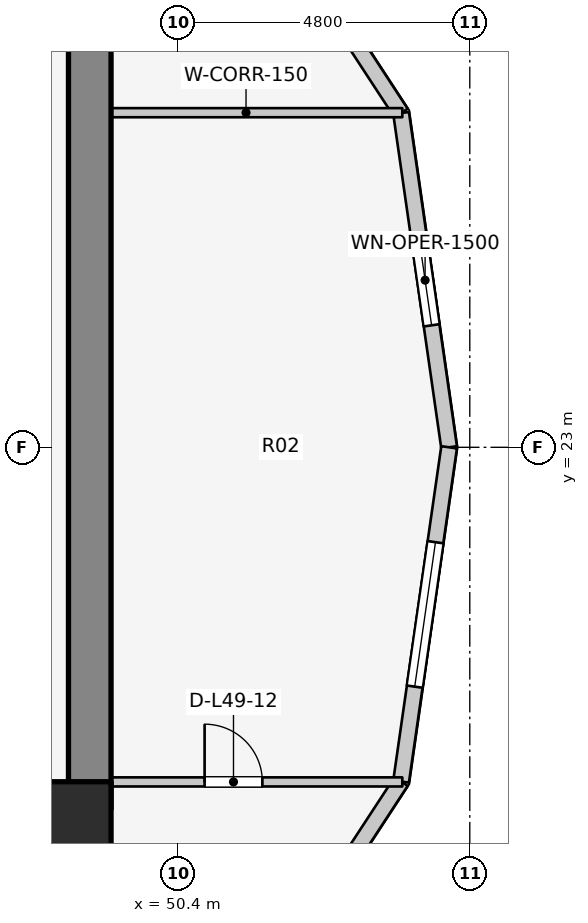
"""IFC4 building model, lengths in metres.
Left out: names, types, materials, properties, quantities, classifications, styles, units other than length and angle.
Written with IfcOpenShell. Run it as: python <this file> out.ifc"""

import sys

from ifc_helpers import new_model, si_unit, direction, frame, frame_2d, origin, origin_2d, place, context, subcontext, project, spatial, rectangle, extrude, element, fill, save


model = new_model("IFC4")
c1 = context("Model", 3, precision=1e-05, world=origin(), true_north=direction((0.0, 1.0)))
c2 = subcontext(c1, "Body", "Model", "MODEL_VIEW")
j1 = project(units=[si_unit("LENGTHUNIT", "METRE"), si_unit("PLANEANGLEUNIT", "RADIAN")], contexts=[c1])
p1 = place(None, origin())
s1 = spatial("IfcSite", under=j1, at=p1, CompositionType="ELEMENT")
p2 = place(p1, origin())
s2 = spatial("IfcBuilding", under=s1, at=p2, CompositionType="ELEMENT")
p3 = place(p2, frame((0.0, 0.0, 162.2)))
s3 = spatial("IfcBuildingStorey", under=s2, at=p3, CompositionType="ELEMENT", Elevation=162.2)
p4 = place(p3, frame((48.95, 17.05, 0.0), z_axis=(0.0, 0.0, 1.0), x_axis=(0.0, 1.0, 0.0)))
e1 = element("IfcWall", 1, at=p4, inside=s3, PredefinedType="SHEAR", context=c2, shape_type="SweptSolid", body=[
    extrude(rectangle(XDim=12.8, YDim=0.7, at=frame_2d((6.4, 0.0))), origin(), (0.0, 0.0, 1.0), 3.1),
])
p5 = place(p3, frame((48.7, 16.9, 0.0), z_axis=(0.0, 0.0, 1.0), x_axis=(1.0, 0.0, 0.0)))
e2 = element("IfcColumn", 2, at=p5, inside=s3, PredefinedType="COLUMN", context=c2, shape_type="SweptSolid", body=[
    extrude(rectangle(XDim=1.2, YDim=1.2, at=origin_2d()), origin(), (0.0, 0.0, 1.0), 3.1),
])
p6 = place(p3, frame((54.86, 23.0, 0.0), z_axis=(0.0, 0.0, 1.0), x_axis=(-0.142227632286, 0.989833976288, 0.0)))
e3 = element("IfcWall", 3, at=p6, inside=s3, PredefinedType="STANDARD", context=c2, shape_type="SweptSolid", body=[
    extrude(rectangle(XDim=5.553, YDim=0.26, at=frame_2d((2.776, 0.0))), origin(), (0.0, 0.0, 1.0), 2.85),
])
p7 = place(p6, frame((2.027, 0.0, 0.75)))
e4 = element("IfcOpeningElement", 4, at=p7, cuts=e3, PredefinedType="OPENING", context=c2, shape_type="SweptSolid", body=[
    extrude(rectangle(XDim=1.5, YDim=1.6, at=frame_2d((0.75, 0.8))), frame((0.0, 0.14, 0.0), z_axis=(0.0, -1.0, 0.0), x_axis=(1.0, 0.0, 0.0)), (0.0, 0.0, 1.0), 0.28),
])
p8 = place(p3, frame((54.07, 28.497, 0.0), z_axis=(0.0, 0.0, 1.0), x_axis=(-0.547456494366, 0.836834145322, 0.0)))
e5 = element("IfcWall", 5, at=p8, inside=s3, PredefinedType="STANDARD", context=c2, shape_type="SweptSolid", body=[
    extrude(rectangle(XDim=4.477, YDim=0.26, at=frame_2d((2.239, 0.0))), origin(), (0.0, 0.0, 1.0), 2.85),
])
p9 = place(p8, frame((1.489, 0.0, 0.75)))
e6 = element("IfcOpeningElement", 6, at=p9, cuts=e5, PredefinedType="OPENING", context=c2, shape_type="SweptSolid", body=[
    extrude(rectangle(XDim=1.5, YDim=1.6, at=frame_2d((0.75, 0.8))), frame((0.0, 0.14, 0.0), z_axis=(0.0, -1.0, 0.0), x_axis=(1.0, 0.0, 0.0)), (0.0, 0.0, 1.0), 0.28),
])
p10 = place(p3, frame((51.619, 13.757, 0.0), z_axis=(0.0, 0.0, 1.0), x_axis=(0.547456494366, 0.836834145322, 0.0)))
e7 = element("IfcWall", 7, at=p10, inside=s3, PredefinedType="STANDARD", context=c2, shape_type="SweptSolid", body=[
    extrude(rectangle(XDim=4.477, YDim=0.26, at=frame_2d((2.239, 0.0))), origin(), (0.0, 0.0, 1.0), 2.85),
])
p11 = place(p10, frame((1.489, 0.0, 0.75)))
e8 = element("IfcOpeningElement", 8, at=p11, cuts=e7, PredefinedType="OPENING", context=c2, shape_type="SweptSolid", body=[
    extrude(rectangle(XDim=1.5, YDim=1.6, at=frame_2d((0.75, 0.8))), frame((0.0, 0.14, 0.0), z_axis=(0.0, -1.0, 0.0), x_axis=(1.0, 0.0, 0.0)), (0.0, 0.0, 1.0), 0.28),
])
p12 = place(p3, frame((54.07, 17.503, 0.0), z_axis=(0.0, 0.0, 1.0), x_axis=(0.142227632286, 0.989833976288, 0.0)))
e9 = element("IfcWall", 9, at=p12, inside=s3, PredefinedType="STANDARD", context=c2, shape_type="SweptSolid", body=[
    extrude(rectangle(XDim=5.553, YDim=0.26, at=frame_2d((2.776, 0.0))), origin(), (0.0, 0.0, 1.0), 2.85),
])
p13 = place(p12, frame((1.576, 0.0, 0.75)))
e10 = element("IfcOpeningElement", 10, at=p13, cuts=e9, PredefinedType="OPENING", context=c2, shape_type="SweptSolid", body=[
    extrude(rectangle(XDim=2.4, YDim=1.7, at=frame_2d((1.2, 0.85))), frame((0.0, 0.14, 0.0), z_axis=(0.0, -1.0, 0.0), x_axis=(1.0, 0.0, 0.0)), (0.0, 0.0, 1.0), 0.28),
])
p14 = place(p3, frame((48.95, 17.497, 0.0), z_axis=(0.0, 0.0, 1.0), x_axis=(1.0, 0.0, 0.0)))
e11 = element("IfcWall", 11, at=p14, inside=s3, PredefinedType="PARTITIONING", context=c2, shape_type="SweptSolid", body=[
    extrude(rectangle(XDim=5.14, YDim=0.15, at=frame_2d((2.57, 0.0))), origin(), (0.0, 0.0, 1.0), 2.855),
])
p15 = place(p14, frame((1.889, 0.0, 0.0)))
e12 = element("IfcOpeningElement", 12, at=p15, cuts=e11, PredefinedType="OPENING", context=c2, shape_type="SweptSolid", body=[
    extrude(rectangle(XDim=0.95, YDim=2.1, at=frame_2d((0.475, 1.05))), frame((0.0, 0.085, 0.0), z_axis=(0.0, -1.0, 0.0), x_axis=(1.0, 0.0, 0.0)), (0.0, 0.0, 1.0), 0.17),
])
p16 = place(p3, frame((48.95, 28.503, 0.0), z_axis=(0.0, 0.0, 1.0), x_axis=(1.0, 0.0, 0.0)))
e13 = element("IfcWall", 13, at=p16, inside=s3, PredefinedType="PARTITIONING", context=c2, shape_type="SweptSolid", body=[
    extrude(rectangle(XDim=5.14, YDim=0.15, at=frame_2d((2.57, 0.0))), origin(), (0.0, 0.0, 1.0), 2.855),
])
p17 = place(p7, origin())
e14 = element("IfcWindow", 14, at=p17, inside=s3, PartitioningType="SINGLE_PANEL", PredefinedType="WINDOW", context=c2, shape_type="SweptSolid", body=[
    extrude(rectangle(XDim=1.5, YDim=1.6, at=frame_2d((0.75, 0.8))), frame((0.0, 0.03, 0.0), z_axis=(0.0, -1.0, 0.0), x_axis=(1.0, 0.0, 0.0)), (0.0, 0.0, 1.0), 0.06),
])
fill(e4, e14)
p18 = place(p13, origin())
e15 = element("IfcWindow", 15, at=p18, inside=s3, PartitioningType="SINGLE_PANEL", PredefinedType="WINDOW", context=c2, shape_type="SweptSolid", body=[
    extrude(rectangle(XDim=2.4, YDim=1.7, at=frame_2d((1.2, 0.85))), frame((0.0, 0.03, 0.0), z_axis=(0.0, -1.0, 0.0), x_axis=(1.0, 0.0, 0.0)), (0.0, 0.0, 1.0), 0.06),
])
fill(e10, e15)
p19 = place(p15, origin())
e16 = element("IfcDoor", 16, at=p19, inside=s3, OperationType="SINGLE_SWING_LEFT", PredefinedType="DOOR", context=c2, shape_type="SweptSolid", body=[
    extrude(rectangle(XDim=0.95, YDim=2.1, at=frame_2d((0.475, 1.05))), frame((0.0, 0.025, 0.0), z_axis=(0.0, -1.0, 0.0), x_axis=(1.0, 0.0, 0.0)), (0.0, 0.0, 1.0), 0.05),
])
fill(e12, e16)
save(model, sys.argv[1])
